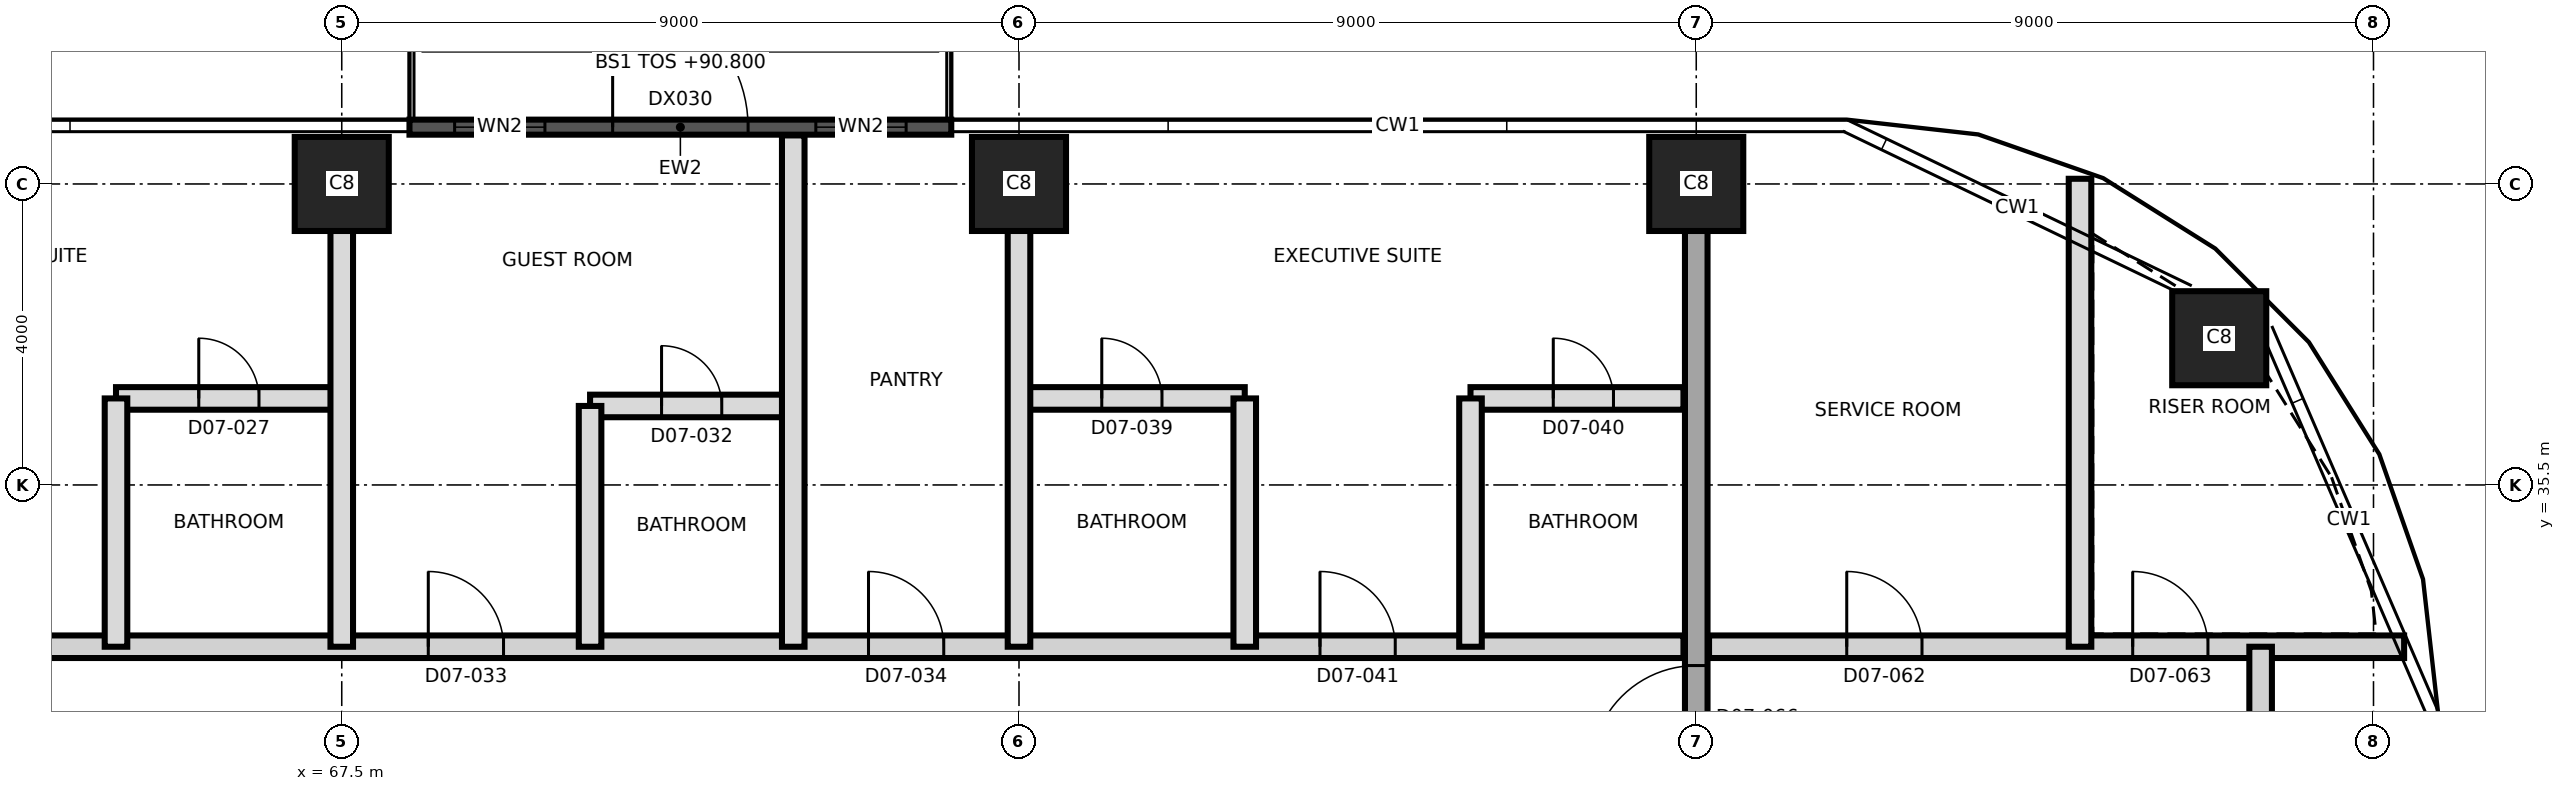
"""IFC4 building model, lengths in metres.
Left out: names, types, materials, properties, quantities, classifications, styles, units other than length and angle.
Written with IfcOpenShell. Run it as: python <this file> out.ifc"""

import sys

from ifc_helpers import new_model, si_unit, direction, frame, frame_2d, origin, origin_2d, place, context, subcontext, project, spatial, rectangle, extrude, element, fill, save


model = new_model("IFC4")
c1 = context("Model", 3, precision=1e-05, world=origin(), true_north=direction((0.0, 1.0)))
c2 = subcontext(c1, "Body", "Model", "MODEL_VIEW")
j1 = project(units=[si_unit("LENGTHUNIT", "METRE"), si_unit("PLANEANGLEUNIT", "RADIAN")], contexts=[c1])
p1 = place(None, origin())
s1 = spatial("IfcSite", under=j1, at=p1, CompositionType="ELEMENT")
p2 = place(p1, origin())
s2 = spatial("IfcBuilding", under=s1, at=p2, CompositionType="ELEMENT")
p3 = place(p2, frame((0.0, 0.0, 90.8)))
s3 = spatial("IfcBuildingStorey", under=s2, at=p3, CompositionType="ELEMENT", Elevation=90.8)
for number, where, z_axis, x_axis in (
    (1, (92.45, 37.45, 0.0), (0.0, 0.0, 1.0), (1.0, 0.0, 0.0)),
    (2, (67.5, 39.5, 0.0), (0.0, 0.0, 1.0), (1.0, 0.0, 0.0)),
    (3, (76.5, 39.5, 0.0), (0.0, 0.0, 1.0), (1.0, 0.0, 0.0)),
    (4, (85.5, 39.5, 0.0), (0.0, 0.0, 1.0), (1.0, 0.0, 0.0)),
):
    element("IfcColumn", number, at=place(p3, frame(where, z_axis=z_axis, x_axis=x_axis)), inside=s3, PredefinedType="COLUMN", context=c2, shape_type="SweptSolid", body=[
        extrude(rectangle(XDim=1.25, YDim=1.25, at=origin_2d()), origin(), (0.0, 0.0, 1.0), 3.7),
    ])
p4 = place(p3, frame((85.5, 20.995, 0.0), z_axis=(0.0, 0.0, 1.0), x_axis=(0.0, 1.0, 0.0)))
e5 = element("IfcWall", 5, at=p4, inside=s3, PredefinedType="SHEAR", context=c2, shape_type="SweptSolid", body=[
    extrude(rectangle(XDim=19.01, YDim=0.3, at=frame_2d((9.505, 0.0))), origin(), (0.0, 0.0, 1.0), 3.7),
])
p5 = place(p4, frame((10.705, 0.0, 0.0)))
e6 = element("IfcOpeningElement", 6, at=p5, cuts=e5, PredefinedType="OPENING", context=c2, shape_type="SweptSolid", body=[
    extrude(rectangle(XDim=1.4, YDim=2.1, at=frame_2d((0.7, 1.05))), frame((0.0, 0.16, 0.0), z_axis=(0.0, -1.0, 0.0), x_axis=(1.0, 0.0, 0.0)), (0.0, 0.0, 1.0), 0.32),
])
p6 = place(p3, frame((68.4, 40.255, 0.0), z_axis=(0.0, 0.0, 1.0), x_axis=(1.0, 0.0, 0.0)))
e7 = element("IfcWall", 7, at=p6, inside=s3, PredefinedType="SOLIDWALL", context=c2, shape_type="SweptSolid", body=[
    extrude(rectangle(XDim=7.2, YDim=0.2, at=frame_2d((3.6, 0.0))), origin(), (0.0, 0.0, 1.0), 3.4),
])
p7 = place(p6, frame((2.7, 0.0, 0.0)))
e8 = element("IfcOpeningElement", 8, at=p7, cuts=e7, PredefinedType="OPENING", context=c2, shape_type="SweptSolid", body=[
    extrude(rectangle(XDim=1.8, YDim=2.4, at=frame_2d((0.9, 1.2))), frame((0.0, 0.11, 0.0), z_axis=(0.0, -1.0, 0.0), x_axis=(1.0, 0.0, 0.0)), (0.0, 0.0, 1.0), 0.22),
])
p8 = place(p6, frame((5.4, 0.0, 0.9)))
e9 = element("IfcOpeningElement", 9, at=p8, cuts=e7, PredefinedType="OPENING", context=c2, shape_type="SweptSolid", body=[
    extrude(rectangle(XDim=1.2, YDim=2.1, at=frame_2d((0.6, 1.05))), frame((0.0, 0.11, 0.0), z_axis=(0.0, -1.0, 0.0), x_axis=(1.0, 0.0, 0.0)), (0.0, 0.0, 1.0), 0.22),
])
p9 = place(p6, frame((0.6, 0.0, 0.9)))
e10 = element("IfcOpeningElement", 10, at=p9, cuts=e7, PredefinedType="OPENING", context=c2, shape_type="SweptSolid", body=[
    extrude(rectangle(XDim=1.2, YDim=2.1, at=frame_2d((0.6, 1.05))), frame((0.0, 0.11, 0.0), z_axis=(0.0, -1.0, 0.0), x_axis=(1.0, 0.0, 0.0)), (0.0, 0.0, 1.0), 0.22),
])
p10 = place(p3, frame((58.8, 33.35, 0.0), z_axis=(0.0, 0.0, 1.0), x_axis=(1.0, 0.0, 0.0)))
e11 = element("IfcWall", 11, at=p10, inside=s3, PredefinedType="PARTITIONING", context=c2, shape_type="SweptSolid", body=[
    extrude(rectangle(XDim=26.53, YDim=0.3, at=frame_2d((13.265, 0.0))), origin(), (0.0, 0.0, 1.0), 3.4),
])
p11 = place(p10, frame((3.7, 0.0, 0.0)))
e12 = element("IfcOpeningElement", 12, at=p11, cuts=e11, PredefinedType="OPENING", context=c2, shape_type="SweptSolid", body=[
    extrude(rectangle(XDim=1.0, YDim=2.4, at=frame_2d((0.5, 1.2))), frame((0.0, 0.16, 0.0), z_axis=(0.0, -1.0, 0.0), x_axis=(1.0, 0.0, 0.0)), (0.0, 0.0, 1.0), 0.32),
])
p12 = place(p10, frame((9.85, 0.0, 0.0)))
e13 = element("IfcOpeningElement", 13, at=p12, cuts=e11, PredefinedType="OPENING", context=c2, shape_type="SweptSolid", body=[
    extrude(rectangle(XDim=1.0, YDim=2.1, at=frame_2d((0.5, 1.05))), frame((0.0, 0.16, 0.0), z_axis=(0.0, -1.0, 0.0), x_axis=(1.0, 0.0, 0.0)), (0.0, 0.0, 1.0), 0.32),
])
p13 = place(p10, frame((15.7, 0.0, 0.0)))
e14 = element("IfcOpeningElement", 14, at=p13, cuts=e11, PredefinedType="OPENING", context=c2, shape_type="SweptSolid", body=[
    extrude(rectangle(XDim=1.0, YDim=2.1, at=frame_2d((0.5, 1.05))), frame((0.0, 0.16, 0.0), z_axis=(0.0, -1.0, 0.0), x_axis=(1.0, 0.0, 0.0)), (0.0, 0.0, 1.0), 0.32),
])
p14 = place(p10, frame((21.7, 0.0, 0.0)))
e15 = element("IfcOpeningElement", 15, at=p14, cuts=e11, PredefinedType="OPENING", context=c2, shape_type="SweptSolid", body=[
    extrude(rectangle(XDim=1.0, YDim=2.4, at=frame_2d((0.5, 1.2))), frame((0.0, 0.16, 0.0), z_axis=(0.0, -1.0, 0.0), x_axis=(1.0, 0.0, 0.0)), (0.0, 0.0, 1.0), 0.32),
])
p15 = place(p3, frame((85.67, 33.35, 0.0), z_axis=(0.0, 0.0, 1.0), x_axis=(1.0, 0.0, 0.0)))
e16 = element("IfcWall", 16, at=p15, inside=s3, PredefinedType="PARTITIONING", context=c2, shape_type="SweptSolid", body=[
    extrude(rectangle(XDim=9.237, YDim=0.3, at=frame_2d((4.619, 0.0))), origin(), (0.0, 0.0, 1.0), 3.4),
])
p16 = place(p15, frame((1.83, 0.0, 0.0)))
e17 = element("IfcOpeningElement", 17, at=p16, cuts=e16, PredefinedType="OPENING", context=c2, shape_type="SweptSolid", body=[
    extrude(rectangle(XDim=1.0, YDim=2.1, at=frame_2d((0.5, 1.05))), frame((0.0, 0.16, 0.0), z_axis=(0.0, -1.0, 0.0), x_axis=(1.0, 0.0, 0.0)), (0.0, 0.0, 1.0), 0.32),
])
p17 = place(p15, frame((5.63, 0.0, 0.0)))
e18 = element("IfcOpeningElement", 18, at=p17, cuts=e16, PredefinedType="OPENING", context=c2, shape_type="SweptSolid", body=[
    extrude(rectangle(XDim=1.0, YDim=2.1, at=frame_2d((0.5, 1.05))), frame((0.0, 0.16, 0.0), z_axis=(0.0, -1.0, 0.0), x_axis=(1.0, 0.0, 0.0)), (0.0, 0.0, 1.0), 0.32),
])
p18 = place(p3, frame((70.8, 36.55, 0.0), z_axis=(0.0, 0.0, 1.0), x_axis=(1.0, 0.0, 0.0)))
e19 = element("IfcWall", 19, at=p18, inside=s3, PredefinedType="PARTITIONING", context=c2, shape_type="SweptSolid", body=[
    extrude(rectangle(XDim=2.7, YDim=0.3, at=frame_2d((1.35, 0.0))), origin(), (0.0, 0.0, 1.0), 3.4),
])
p19 = place(p18, frame((0.95, 0.0, 0.0)))
e20 = element("IfcOpeningElement", 20, at=p19, cuts=e19, PredefinedType="OPENING", context=c2, shape_type="SweptSolid", body=[
    extrude(rectangle(XDim=0.8, YDim=2.1, at=frame_2d((0.4, 1.05))), frame((0.0, 0.16, 0.0), z_axis=(0.0, -1.0, 0.0), x_axis=(1.0, 0.0, 0.0)), (0.0, 0.0, 1.0), 0.32),
])
p20 = place(p3, frame((64.5, 36.65, 0.0), z_axis=(0.0, 0.0, 1.0), x_axis=(1.0, 0.0, 0.0)))
e21 = element("IfcWall", 21, at=p20, inside=s3, PredefinedType="PARTITIONING", context=c2, shape_type="SweptSolid", body=[
    extrude(rectangle(XDim=3.0, YDim=0.3, at=frame_2d((1.5, 0.0))), origin(), (0.0, 0.0, 1.0), 3.4),
])
p21 = place(p20, frame((1.1, 0.0, 0.0)))
e22 = element("IfcOpeningElement", 22, at=p21, cuts=e21, PredefinedType="OPENING", context=c2, shape_type="SweptSolid", body=[
    extrude(rectangle(XDim=0.8, YDim=2.1, at=frame_2d((0.4, 1.05))), frame((0.0, 0.16, 0.0), z_axis=(0.0, -1.0, 0.0), x_axis=(1.0, 0.0, 0.0)), (0.0, 0.0, 1.0), 0.32),
])
p22 = place(p3, frame((76.5, 36.65, 0.0), z_axis=(0.0, 0.0, 1.0), x_axis=(1.0, 0.0, 0.0)))
e23 = element("IfcWall", 23, at=p22, inside=s3, PredefinedType="PARTITIONING", context=c2, shape_type="SweptSolid", body=[
    extrude(rectangle(XDim=3.0, YDim=0.3, at=frame_2d((1.5, 0.0))), origin(), (0.0, 0.0, 1.0), 3.4),
])
p23 = place(p22, frame((1.1, 0.0, 0.0)))
e24 = element("IfcOpeningElement", 24, at=p23, cuts=e23, PredefinedType="OPENING", context=c2, shape_type="SweptSolid", body=[
    extrude(rectangle(XDim=0.8, YDim=2.1, at=frame_2d((0.4, 1.05))), frame((0.0, 0.16, 0.0), z_axis=(0.0, -1.0, 0.0), x_axis=(1.0, 0.0, 0.0)), (0.0, 0.0, 1.0), 0.32),
])
p24 = place(p3, frame((82.5, 36.65, 0.0), z_axis=(0.0, 0.0, 1.0), x_axis=(1.0, 0.0, 0.0)))
e25 = element("IfcWall", 25, at=p24, inside=s3, PredefinedType="PARTITIONING", context=c2, shape_type="SweptSolid", body=[
    extrude(rectangle(XDim=2.83, YDim=0.3, at=frame_2d((1.415, 0.0))), origin(), (0.0, 0.0, 1.0), 3.4),
])
p25 = place(p24, frame((1.1, 0.0, 0.0)))
e26 = element("IfcOpeningElement", 26, at=p25, cuts=e25, PredefinedType="OPENING", context=c2, shape_type="SweptSolid", body=[
    extrude(rectangle(XDim=0.8, YDim=2.1, at=frame_2d((0.4, 1.05))), frame((0.0, 0.16, 0.0), z_axis=(0.0, -1.0, 0.0), x_axis=(1.0, 0.0, 0.0)), (0.0, 0.0, 1.0), 0.32),
])
p26 = place(p3, frame((64.5, 33.35, 0.0), z_axis=(0.0, 0.0, 1.0), x_axis=(0.0, 1.0, 0.0)))
e27 = element("IfcWall", 27, at=p26, inside=s3, PredefinedType="PARTITIONING", context=c2, shape_type="SweptSolid", body=[
    extrude(rectangle(XDim=3.3, YDim=0.3, at=frame_2d((1.65, 0.0))), origin(), (0.0, 0.0, 1.0), 3.4),
])
p27 = place(p3, frame((67.5, 33.35, 0.0), z_axis=(0.0, 0.0, 1.0), x_axis=(0.0, 1.0, 0.0)))
e28 = element("IfcWall", 28, at=p27, inside=s3, PredefinedType="PARTITIONING", context=c2, shape_type="SweptSolid", body=[
    extrude(rectangle(XDim=6.655, YDim=0.3, at=frame_2d((3.327, 0.0))), origin(), (0.0, 0.0, 1.0), 3.4),
])
p28 = place(p3, frame((70.8, 33.35, 0.0), z_axis=(0.0, 0.0, 1.0), x_axis=(0.0, 1.0, 0.0)))
e29 = element("IfcWall", 29, at=p28, inside=s3, PredefinedType="PARTITIONING", context=c2, shape_type="SweptSolid", body=[
    extrude(rectangle(XDim=3.2, YDim=0.3, at=frame_2d((1.6, 0.0))), origin(), (0.0, 0.0, 1.0), 3.4),
])
p29 = place(p3, frame((73.5, 33.35, 0.0), z_axis=(0.0, 0.0, 1.0), x_axis=(0.0, 1.0, 0.0)))
e30 = element("IfcWall", 30, at=p29, inside=s3, PredefinedType="PARTITIONING", context=c2, shape_type="SweptSolid", body=[
    extrude(rectangle(XDim=6.795, YDim=0.3, at=frame_2d((3.397, 0.0))), origin(), (0.0, 0.0, 1.0), 3.4),
])
p30 = place(p3, frame((76.5, 33.35, 0.0), z_axis=(0.0, 0.0, 1.0), x_axis=(0.0, 1.0, 0.0)))
e31 = element("IfcWall", 31, at=p30, inside=s3, PredefinedType="PARTITIONING", context=c2, shape_type="SweptSolid", body=[
    extrude(rectangle(XDim=6.655, YDim=0.3, at=frame_2d((3.327, 0.0))), origin(), (0.0, 0.0, 1.0), 3.4),
])
for number, where, z_axis, x_axis in (
    (32, (79.5, 33.35, 0.0), (0.0, 0.0, 1.0), (0.0, 1.0, 0.0)),
    (33, (82.5, 33.35, 0.0), (0.0, 0.0, 1.0), (0.0, 1.0, 0.0)),
):
    element("IfcWall", number, at=place(p3, frame(where, z_axis=z_axis, x_axis=x_axis)), inside=s3, PredefinedType="PARTITIONING", context=c2, shape_type="SweptSolid", body=[
        extrude(rectangle(XDim=3.3, YDim=0.3, at=frame_2d((1.65, 0.0))), origin(), (0.0, 0.0, 1.0), 3.4),
    ])
p31 = place(p3, frame((90.6, 33.35, 0.0), z_axis=(0.0, 0.0, 1.0), x_axis=(0.0, 1.0, 0.0)))
e34 = element("IfcWall", 34, at=p31, inside=s3, PredefinedType="PARTITIONING", context=c2, shape_type="SweptSolid", body=[
    extrude(rectangle(XDim=6.219, YDim=0.3, at=frame_2d((3.109, 0.0))), origin(), (0.0, 0.0, 1.0), 3.4),
])
p32 = place(p3, frame((93.0, 30.65, 0.0), z_axis=(0.0, 0.0, 1.0), x_axis=(0.0, 1.0, 0.0)))
e35 = element("IfcWall", 35, at=p32, inside=s3, PredefinedType="PARTITIONING", context=c2, shape_type="SweptSolid", body=[
    extrude(rectangle(XDim=2.7, YDim=0.3, at=frame_2d((1.35, 0.0))), origin(), (0.0, 0.0, 1.0), 3.4),
])
p33 = place(p7, origin())
e36 = element("IfcDoor", 36, at=p33, inside=s3, OperationType="SINGLE_SWING_LEFT", PredefinedType="DOOR", context=c2, shape_type="SweptSolid", body=[
    extrude(rectangle(XDim=1.8, YDim=2.4, at=frame_2d((0.9, 1.2))), frame((0.0, 0.025, 0.0), z_axis=(0.0, -1.0, 0.0), x_axis=(1.0, 0.0, 0.0)), (0.0, 0.0, 1.0), 0.05),
])
fill(e8, e36)
p34 = place(p8, origin())
e37 = element("IfcWindow", 37, at=p34, inside=s3, PartitioningType="SINGLE_PANEL", PredefinedType="WINDOW", context=c2, shape_type="SweptSolid", body=[
    extrude(rectangle(XDim=1.2, YDim=2.1, at=frame_2d((0.6, 1.05))), frame((0.0, 0.03, 0.0), z_axis=(0.0, -1.0, 0.0), x_axis=(1.0, 0.0, 0.0)), (0.0, 0.0, 1.0), 0.06),
])
fill(e9, e37)
p35 = place(p9, origin())
e38 = element("IfcWindow", 38, at=p35, inside=s3, PartitioningType="SINGLE_PANEL", PredefinedType="WINDOW", context=c2, shape_type="SweptSolid", body=[
    extrude(rectangle(XDim=1.2, YDim=2.1, at=frame_2d((0.6, 1.05))), frame((0.0, 0.03, 0.0), z_axis=(0.0, -1.0, 0.0), x_axis=(1.0, 0.0, 0.0)), (0.0, 0.0, 1.0), 0.06),
])
fill(e10, e38)
p36 = place(p21, origin())
e39 = element("IfcDoor", 39, at=p36, inside=s3, OperationType="SINGLE_SWING_RIGHT", PredefinedType="DOOR", context=c2, shape_type="SweptSolid", body=[
    extrude(rectangle(XDim=0.8, YDim=2.1, at=frame_2d((0.4, 1.05))), frame((0.0, 0.025, 0.0), z_axis=(0.0, -1.0, 0.0), x_axis=(1.0, 0.0, 0.0)), (0.0, 0.0, 1.0), 0.05),
])
fill(e22, e39)
p37 = place(p19, origin())
e40 = element("IfcDoor", 40, at=p37, inside=s3, OperationType="SINGLE_SWING_LEFT", PredefinedType="DOOR", context=c2, shape_type="SweptSolid", body=[
    extrude(rectangle(XDim=0.8, YDim=2.1, at=frame_2d((0.4, 1.05))), frame((0.0, 0.025, 0.0), z_axis=(0.0, -1.0, 0.0), x_axis=(1.0, 0.0, 0.0)), (0.0, 0.0, 1.0), 0.05),
])
fill(e20, e40)
p38 = place(p12, origin())
e41 = element("IfcDoor", 41, at=p38, inside=s3, OperationType="SINGLE_SWING_LEFT", PredefinedType="DOOR", context=c2, shape_type="SweptSolid", body=[
    extrude(rectangle(XDim=1.0, YDim=2.1, at=frame_2d((0.5, 1.05))), frame((0.0, 0.025, 0.0), z_axis=(0.0, -1.0, 0.0), x_axis=(1.0, 0.0, 0.0)), (0.0, 0.0, 1.0), 0.05),
])
fill(e13, e41)
p39 = place(p13, origin())
e42 = element("IfcDoor", 42, at=p39, inside=s3, OperationType="SINGLE_SWING_RIGHT", PredefinedType="DOOR", context=c2, shape_type="SweptSolid", body=[
    extrude(rectangle(XDim=1.0, YDim=2.1, at=frame_2d((0.5, 1.05))), frame((0.0, 0.025, 0.0), z_axis=(0.0, -1.0, 0.0), x_axis=(1.0, 0.0, 0.0)), (0.0, 0.0, 1.0), 0.05),
])
fill(e14, e42)
p40 = place(p23, origin())
e43 = element("IfcDoor", 43, at=p40, inside=s3, OperationType="SINGLE_SWING_RIGHT", PredefinedType="DOOR", context=c2, shape_type="SweptSolid", body=[
    extrude(rectangle(XDim=0.8, YDim=2.1, at=frame_2d((0.4, 1.05))), frame((0.0, 0.025, 0.0), z_axis=(0.0, -1.0, 0.0), x_axis=(1.0, 0.0, 0.0)), (0.0, 0.0, 1.0), 0.05),
])
fill(e24, e43)
p41 = place(p25, origin())
e44 = element("IfcDoor", 44, at=p41, inside=s3, OperationType="SINGLE_SWING_LEFT", PredefinedType="DOOR", context=c2, shape_type="SweptSolid", body=[
    extrude(rectangle(XDim=0.8, YDim=2.1, at=frame_2d((0.4, 1.05))), frame((0.0, 0.025, 0.0), z_axis=(0.0, -1.0, 0.0), x_axis=(1.0, 0.0, 0.0)), (0.0, 0.0, 1.0), 0.05),
])
fill(e26, e44)
p42 = place(p14, origin())
e45 = element("IfcDoor", 45, at=p42, inside=s3, OperationType="SINGLE_SWING_LEFT", PredefinedType="DOOR", context=c2, shape_type="SweptSolid", body=[
    extrude(rectangle(XDim=1.0, YDim=2.4, at=frame_2d((0.5, 1.2))), frame((0.0, 0.025, 0.0), z_axis=(0.0, -1.0, 0.0), x_axis=(1.0, 0.0, 0.0)), (0.0, 0.0, 1.0), 0.05),
])
fill(e15, e45)
p43 = place(p16, origin())
e46 = element("IfcDoor", 46, at=p43, inside=s3, OperationType="SINGLE_SWING_LEFT", PredefinedType="DOOR", context=c2, shape_type="SweptSolid", body=[
    extrude(rectangle(XDim=1.0, YDim=2.1, at=frame_2d((0.5, 1.05))), frame((0.0, 0.025, 0.0), z_axis=(0.0, -1.0, 0.0), x_axis=(1.0, 0.0, 0.0)), (0.0, 0.0, 1.0), 0.05),
])
fill(e17, e46)
p44 = place(p17, origin())
e47 = element("IfcDoor", 47, at=p44, inside=s3, OperationType="SINGLE_SWING_RIGHT", PredefinedType="DOOR", context=c2, shape_type="SweptSolid", body=[
    extrude(rectangle(XDim=1.0, YDim=2.1, at=frame_2d((0.5, 1.05))), frame((0.0, 0.025, 0.0), z_axis=(0.0, -1.0, 0.0), x_axis=(1.0, 0.0, 0.0)), (0.0, 0.0, 1.0), 0.05),
])
fill(e18, e47)
p45 = place(p5, origin())
e48 = element("IfcDoor", 48, at=p45, inside=s3, OperationType="SINGLE_SWING_RIGHT", PredefinedType="DOOR", context=c2, shape_type="SweptSolid", body=[
    extrude(rectangle(XDim=1.4, YDim=2.1, at=frame_2d((0.7, 1.05))), frame((0.0, 0.025, 0.0), z_axis=(0.0, -1.0, 0.0), x_axis=(1.0, 0.0, 0.0)), (0.0, 0.0, 1.0), 0.05),
])
fill(e6, e48)
save(model, sys.argv[1])
